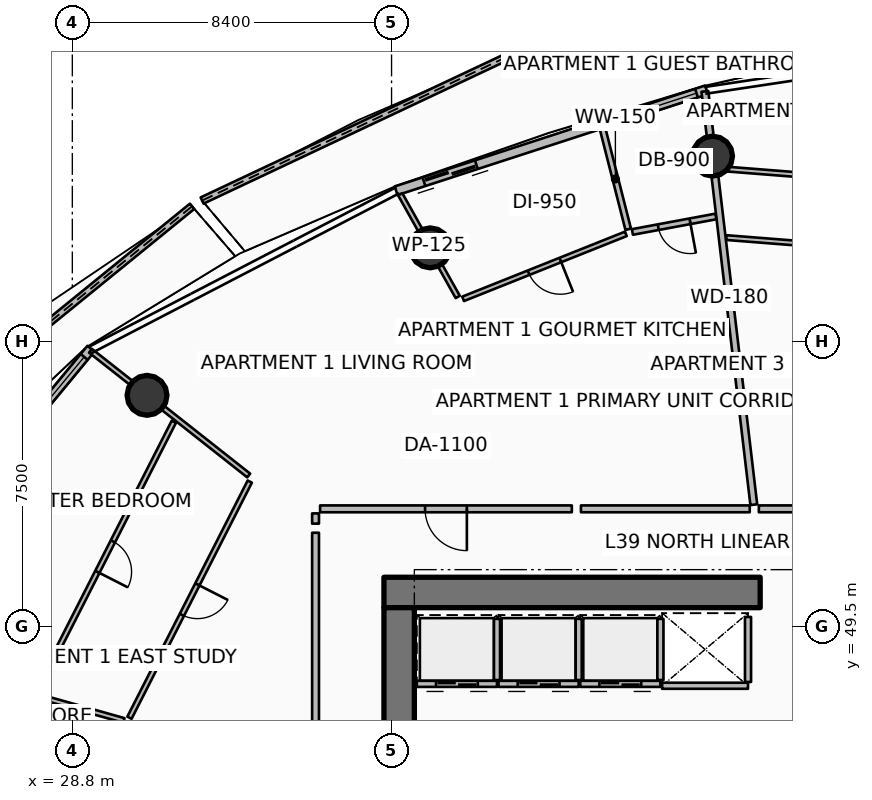
"""IFC4 building model, lengths in metres.
Left out: names, types, materials, properties, quantities, classifications, styles, units other than length and angle.
Written with IfcOpenShell. Run it as: python <this file> out.ifc"""

import sys

from ifc_helpers import new_model, si_unit, direction, frame, frame_2d, origin, origin_2d, place, context, subcontext, project, spatial, polyline, rectangle, circle, outline, extrude, element, fill, save


model = new_model("IFC4")
c1 = context("Model", 3, precision=1e-05, world=origin(), true_north=direction((0.0, 1.0)))
c2 = subcontext(c1, "Body", "Model", "MODEL_VIEW")
j1 = project(units=[si_unit("LENGTHUNIT", "METRE"), si_unit("PLANEANGLEUNIT", "RADIAN")], contexts=[c1])
p1 = place(None, origin())
s1 = spatial("IfcSite", under=j1, at=p1, CompositionType="ELEMENT")
p2 = place(p1, origin())
s2 = spatial("IfcBuilding", under=s1, at=p2, CompositionType="ELEMENT")
p3 = place(p2, frame((0.0, 0.0, 157.8)))
s3 = spatial("IfcBuildingStorey", under=s2, at=p3, CompositionType="ELEMENT", Elevation=157.8)
p4 = place(p3, frame((37.0, 50.4, 0.0), z_axis=(0.0, 0.0, 1.0), x_axis=(1.0, 0.0, 0.0)))
e1 = element("IfcWall", 1, at=p4, inside=s3, PredefinedType="SHEAR", context=c2, shape_type="SweptSolid", body=[
    extrude(rectangle(XDim=9.9, YDim=0.8, at=frame_2d((4.95, 0.0))), origin(), (0.0, 0.0, 1.0), 3.75),
])
p5 = place(p3, frame((37.4, 34.0, 0.0), z_axis=(0.0, 0.0, 1.0), x_axis=(0.0, 1.0, 0.0)))
e2 = element("IfcWall", 2, at=p5, inside=s3, PredefinedType="SHEAR", context=c2, shape_type="SweptSolid", body=[
    extrude(rectangle(XDim=16.0, YDim=0.8, at=frame_2d((8.0, 0.0))), origin(), (0.0, 0.0, 1.0), 3.75),
])
for number, where, z_axis, x_axis in (
    (3, (45.647, 61.881, 0.0), (0.0, 0.0, 1.0), (1.0, 0.0, 0.0)),
    (4, (38.218, 59.467, 0.0), (0.0, 0.0, 1.0), (1.0, 0.0, 0.0)),
    (5, (30.766, 55.586, 0.0), (0.0, 0.0, 1.0), (1.0, 0.0, 0.0)),
):
    element("IfcColumn", number, at=place(p3, frame(where, z_axis=z_axis, x_axis=x_axis)), inside=s3, PredefinedType="COLUMN", context=c2, shape_type="SweptSolid", body=[
        extrude(circle(Radius=0.525, at=origin_2d()), origin(), (0.0, 0.0, 1.0), 3.5),
    ])
p6 = place(p3, frame((40.522, 64.628, 0.0), z_axis=(0.0, 0.0, 1.0), x_axis=(-0.904569140233, -0.42632695263, 0.0)))
e6 = element("IfcWall", 6, at=p6, inside=s3, PredefinedType="PARAPET", context=c2, shape_type="SweptSolid", body=[
    extrude(outline(polyline([(0.0, 0.0), (9.184, 0.0), (9.184, 1.233), (4.592, 1.418), (0.0, 1.632), (0.0, 0.0)])), frame((0.0, 0.09, 0.0), z_axis=(0.0, -1.0, 0.0), x_axis=(1.0, 0.0, 0.0)), (0.0, 0.0, 1.0), 0.18),
])
p7 = place(p3, frame((31.951, 60.56, 0.0), z_axis=(0.0, 0.0, 1.0), x_axis=(-0.77587192649, -0.630890445073, 0.0)))
e7 = element("IfcWall", 7, at=p7, inside=s3, PredefinedType="PARAPET", context=c2, shape_type="SweptSolid", body=[
    extrude(outline(polyline([(0.0, 0.0), (9.998, 0.0), (9.998, 1.148), (4.999, 1.127), (0.0, 1.224), (0.0, 0.0)])), frame((0.0, 0.09, 0.0), z_axis=(0.0, -1.0, 0.0), x_axis=(1.0, 0.0, 0.0)), (0.0, 0.0, 1.0), 0.18),
])
p8 = place(p3, frame((45.49, 63.624, 0.0), z_axis=(0.0, 0.0, 1.0), x_axis=(-0.951046390632, -0.309048156224, 0.0)))
e8 = element("IfcWall", 8, at=p8, inside=s3, PredefinedType="SOLIDWALL", context=c2, shape_type="SweptSolid", body=[
    extrude(rectangle(XDim=8.59, YDim=0.24, at=frame_2d((4.295, 0.0))), origin(), (0.0, 0.0, 1.0), 2.45),
])
p9 = place(p8, frame((6.37, 0.0, 0.0)))
e9 = element("IfcOpeningElement", 9, at=p9, cuts=e8, PredefinedType="OPENING", context=c2, shape_type="SweptSolid", body=[
    extrude(rectangle(XDim=1.45, YDim=2.15, at=frame_2d((0.725, 1.075))), frame((0.0, 0.13, 0.0), z_axis=(0.0, -1.0, 0.0), x_axis=(1.0, 0.0, 0.0)), (0.0, 0.0, 1.0), 0.26),
])
p10 = place(p8, frame((0.28, 0.0, 0.65)))
e10 = element("IfcOpeningElement", 10, at=p10, cuts=e8, PredefinedType="OPENING", context=c2, shape_type="SweptSolid", body=[
    extrude(rectangle(XDim=1.6, YDim=1.5, at=frame_2d((0.8, 0.75))), frame((0.0, 0.13, 0.0), z_axis=(0.0, -1.0, 0.0), x_axis=(1.0, 0.0, 0.0)), (0.0, 0.0, 1.0), 0.26),
])
p11 = place(p3, frame((29.291, 56.813, 0.0), z_axis=(0.0, 0.0, 1.0), x_axis=(-0.636771922292, -0.77105221547, 0.0)))
e11 = element("IfcWall", 11, at=p11, inside=s3, PredefinedType="SOLIDWALL", context=c2, shape_type="SweptSolid", body=[
    extrude(rectangle(XDim=10.082, YDim=0.24, at=frame_2d((5.041, 0.0))), origin(), (0.0, 0.0, 1.0), 2.45),
])
p12 = place(p11, frame((7.862, 0.0, 0.0)))
e12 = element("IfcOpeningElement", 12, at=p12, cuts=e11, PredefinedType="OPENING", context=c2, shape_type="SweptSolid", body=[
    extrude(rectangle(XDim=1.45, YDim=2.15, at=frame_2d((0.725, 1.075))), frame((0.0, 0.13, 0.0), z_axis=(0.0, -1.0, 0.0), x_axis=(1.0, 0.0, 0.0)), (0.0, 0.0, 1.0), 0.26),
])
p13 = place(p11, frame((0.28, 0.0, 0.65)))
e13 = element("IfcOpeningElement", 13, at=p13, cuts=e11, PredefinedType="OPENING", context=c2, shape_type="SweptSolid", body=[
    extrude(rectangle(XDim=1.6, YDim=1.5, at=frame_2d((0.8, 0.75))), frame((0.0, 0.13, 0.0), z_axis=(0.0, -1.0, 0.0), x_axis=(1.0, 0.0, 0.0)), (0.0, 0.0, 1.0), 0.26),
])
p14 = place(p3, frame((39.975, 47.995, 0.0), z_axis=(0.0, 0.0, 1.0), x_axis=(-1.0, 0.0, 0.0)))
e14 = element("IfcWall", 14, at=p14, inside=s3, PredefinedType="PARTITIONING", context=c2, shape_type="SweptSolid", body=[
    extrude(rectangle(XDim=2.11, YDim=0.16, at=frame_2d((1.055, 0.0))), origin(), (0.0, 0.0, 1.0), 3.5),
])
p15 = place(p14, frame((0.505, 0.0, 0.0)))
e15 = element("IfcOpeningElement", 15, at=p15, cuts=e14, PredefinedType="OPENING", context=c2, shape_type="SweptSolid", body=[
    extrude(rectangle(XDim=1.1, YDim=2.1, at=frame_2d((0.55, 1.05))), frame((0.0, 0.09, 0.0), z_axis=(0.0, -1.0, 0.0), x_axis=(1.0, 0.0, 0.0)), (0.0, 0.0, 1.0), 0.18),
])
p16 = place(p3, frame((39.975, 48.095, 0.0), z_axis=(0.0, 0.0, 1.0), x_axis=(0.0, 1.0, 0.0)))
e16 = element("IfcWall", 16, at=p16, inside=s3, PredefinedType="PARTITIONING", context=c2, shape_type="SweptSolid", body=[
    extrude(rectangle(XDim=1.61, YDim=0.16, at=frame_2d((0.805, 0.0))), origin(), (0.0, 0.0, 1.0), 3.5),
])
p17 = place(p3, frame((42.125, 47.995, 0.0), z_axis=(0.0, 0.0, 1.0), x_axis=(-1.0, 0.0, 0.0)))
e17 = element("IfcWall", 17, at=p17, inside=s3, PredefinedType="PARTITIONING", context=c2, shape_type="SweptSolid", body=[
    extrude(rectangle(XDim=2.11, YDim=0.16, at=frame_2d((1.055, 0.0))), origin(), (0.0, 0.0, 1.0), 3.5),
])
p18 = place(p17, frame((0.505, 0.0, 0.0)))
e18 = element("IfcOpeningElement", 18, at=p18, cuts=e17, PredefinedType="OPENING", context=c2, shape_type="SweptSolid", body=[
    extrude(rectangle(XDim=1.1, YDim=2.1, at=frame_2d((0.55, 1.05))), frame((0.0, 0.09, 0.0), z_axis=(0.0, -1.0, 0.0), x_axis=(1.0, 0.0, 0.0)), (0.0, 0.0, 1.0), 0.18),
])
p19 = place(p3, frame((42.125, 48.095, 0.0), z_axis=(0.0, 0.0, 1.0), x_axis=(0.0, 1.0, 0.0)))
e19 = element("IfcWall", 19, at=p19, inside=s3, PredefinedType="PARTITIONING", context=c2, shape_type="SweptSolid", body=[
    extrude(rectangle(XDim=1.61, YDim=0.16, at=frame_2d((0.805, 0.0))), origin(), (0.0, 0.0, 1.0), 3.5),
])
p20 = place(p3, frame((44.275, 47.995, 0.0), z_axis=(0.0, 0.0, 1.0), x_axis=(-1.0, 0.0, 0.0)))
e20 = element("IfcWall", 20, at=p20, inside=s3, PredefinedType="PARTITIONING", context=c2, shape_type="SweptSolid", body=[
    extrude(rectangle(XDim=2.11, YDim=0.16, at=frame_2d((1.055, 0.0))), origin(), (0.0, 0.0, 1.0), 3.5),
])
p21 = place(p20, frame((0.505, 0.0, 0.0)))
e21 = element("IfcOpeningElement", 21, at=p21, cuts=e20, PredefinedType="OPENING", context=c2, shape_type="SweptSolid", body=[
    extrude(rectangle(XDim=1.1, YDim=2.1, at=frame_2d((0.55, 1.05))), frame((0.0, 0.09, 0.0), z_axis=(0.0, -1.0, 0.0), x_axis=(1.0, 0.0, 0.0)), (0.0, 0.0, 1.0), 0.18),
])
p22 = place(p3, frame((44.275, 48.095, 0.0), z_axis=(0.0, 0.0, 1.0), x_axis=(0.0, 1.0, 0.0)))
e22 = element("IfcWall", 22, at=p22, inside=s3, PredefinedType="PARTITIONING", context=c2, shape_type="SweptSolid", body=[
    extrude(rectangle(XDim=1.61, YDim=0.16, at=frame_2d((0.805, 0.0))), origin(), (0.0, 0.0, 1.0), 3.5),
])
p23 = place(p3, frame((46.58, 47.945, 0.0), z_axis=(0.0, 0.0, 1.0), x_axis=(-1.0, 0.0, 0.0)))
e23 = element("IfcWall", 23, at=p23, inside=s3, PredefinedType="PARTITIONING", context=c2, shape_type="SweptSolid", body=[
    extrude(rectangle(XDim=2.26, YDim=0.16, at=frame_2d((1.13, 0.0))), origin(), (0.0, 0.0, 1.0), 3.5),
])
p24 = place(p3, frame((46.58, 48.045, 0.0), z_axis=(0.0, 0.0, 1.0), x_axis=(0.0, 1.0, 0.0)))
e24 = element("IfcWall", 24, at=p24, inside=s3, PredefinedType="PARTITIONING", context=c2, shape_type="SweptSolid", body=[
    extrude(rectangle(XDim=1.71, YDim=0.16, at=frame_2d((0.855, 0.0))), origin(), (0.0, 0.0, 1.0), 3.5),
])
p25 = place(p3, frame((46.732, 52.709, 0.0), z_axis=(0.0, 0.0, 1.0), x_axis=(-0.117537145285, 0.993068486802, 0.0)))
e25 = element("IfcWall", 25, at=p25, inside=s3, PredefinedType="PARTITIONING", context=c2, shape_type="SweptSolid", body=[
    extrude(rectangle(XDim=10.951, YDim=0.18, at=frame_2d((5.475, 0.0))), origin(), (0.0, 0.0, 1.0), 2.94),
])
p26 = place(p3, frame((41.944, 52.6, 0.0), z_axis=(0.0, 0.0, 1.0), x_axis=(-1.0, 0.0, 0.0)))
e26 = element("IfcWall", 26, at=p26, inside=s3, PredefinedType="PARTITIONING", context=c2, shape_type="SweptSolid", body=[
    extrude(rectangle(XDim=6.624, YDim=0.18, at=frame_2d((3.312, 0.0))), origin(), (0.0, 0.0, 1.0), 2.94),
])
p27 = place(p26, frame((2.762, 0.0, 0.0)))
e27 = element("IfcOpeningElement", 27, at=p27, cuts=e26, PredefinedType="OPENING", context=c2, shape_type="SweptSolid", body=[
    extrude(rectangle(XDim=1.1, YDim=2.1, at=frame_2d((0.55, 1.05))), frame((0.0, 0.1, 0.0), z_axis=(0.0, -1.0, 0.0), x_axis=(1.0, 0.0, 0.0)), (0.0, 0.0, 1.0), 0.2),
])
p28 = place(p3, frame((35.2, 52.48, 0.0), z_axis=(0.0, 0.0, 1.0), x_axis=(0.0, -1.0, 0.0)))
e28 = element("IfcWall", 28, at=p28, inside=s3, PredefinedType="PARTITIONING", context=c2, shape_type="SweptSolid", body=[
    extrude(rectangle(XDim=0.269, YDim=0.18, at=frame_2d((0.135, 0.0))), origin(), (0.0, 0.0, 1.0), 2.94),
])
p29 = place(p3, frame((46.625, 52.6, 0.0), z_axis=(0.0, 0.0, 1.0), x_axis=(-1.0, 0.0, 0.0)))
e29 = element("IfcWall", 29, at=p29, inside=s3, PredefinedType="PARTITIONING", context=c2, shape_type="SweptSolid", body=[
    extrude(rectangle(XDim=4.442, YDim=0.18, at=frame_2d((2.221, 0.0))), origin(), (0.0, 0.0, 1.0), 2.94),
])
p30 = place(p3, frame((38.941, 58.175, 0.0), z_axis=(0.0, 0.0, 1.0), x_axis=(-0.488620181058, 0.872496600946, 0.0)))
e30 = element("IfcWall", 30, at=p30, inside=s3, PredefinedType="PARTITIONING", context=c2, shape_type="SweptSolid", body=[
    extrude(rectangle(XDim=3.095, YDim=0.125, at=frame_2d((1.548, 0.0))), origin(), (0.0, 0.0, 1.0), 2.94),
])
p31 = place(p3, frame((45.734, 60.293, 0.0), z_axis=(0.0, 0.0, 1.0), x_axis=(-0.983182569162, -0.182625397184, 0.0)))
e31 = element("IfcWall", 31, at=p31, inside=s3, PredefinedType="PARTITIONING", context=c2, shape_type="SweptSolid", body=[
    extrude(rectangle(XDim=2.234, YDim=0.15, at=frame_2d((1.117, 0.0))), origin(), (0.0, 0.0, 1.0), 2.94),
])
p32 = place(p31, frame((0.692, 0.0, 0.0)))
e32 = element("IfcOpeningElement", 32, at=p32, cuts=e31, PredefinedType="OPENING", context=c2, shape_type="SweptSolid", body=[
    extrude(rectangle(XDim=0.85, YDim=2.06, at=frame_2d((0.425, 1.03))), frame((0.0, 0.085, 0.0), z_axis=(0.0, -1.0, 0.0), x_axis=(1.0, 0.0, 0.0)), (0.0, 0.0, 1.0), 0.17),
])
p33 = place(p3, frame((43.427, 59.956, 0.0), z_axis=(0.0, 0.0, 1.0), x_axis=(-0.246779972966, 0.969071537578, 0.0)))
e33 = element("IfcWall", 33, at=p33, inside=s3, PredefinedType="PARTITIONING", context=c2, shape_type="SweptSolid", body=[
    extrude(rectangle(XDim=2.732, YDim=0.15, at=frame_2d((1.366, 0.0))), origin(), (0.0, 0.0, 1.0), 2.94),
])
p34 = place(p3, frame((43.366, 59.835, 0.0), z_axis=(0.0, 0.0, 1.0), x_axis=(-0.928691950022, -0.370852075584, 0.0)))
e34 = element("IfcWall", 34, at=p34, inside=s3, PredefinedType="PARTITIONING", context=c2, shape_type="SweptSolid", body=[
    extrude(rectangle(XDim=4.612, YDim=0.125, at=frame_2d((2.306, 0.0))), origin(), (0.0, 0.0, 1.0), 2.94),
])
p35 = place(p34, frame((1.856, 0.0, 0.0)))
e35 = element("IfcOpeningElement", 35, at=p35, cuts=e34, PredefinedType="OPENING", context=c2, shape_type="SweptSolid", body=[
    extrude(rectangle(XDim=0.9, YDim=2.08, at=frame_2d((0.45, 1.04))), frame((0.0, 0.073, 0.0), z_axis=(0.0, -1.0, 0.0), x_axis=(1.0, 0.0, 0.0)), (0.0, 0.0, 1.0), 0.145),
])
p36 = place(p3, frame((35.2, 51.971, 0.0), z_axis=(0.0, 0.0, 1.0), x_axis=(0.0, -1.0, 0.0)))
e36 = element("IfcWall", 36, at=p36, inside=s3, PredefinedType="PARTITIONING", context=c2, shape_type="SweptSolid", body=[
    extrude(rectangle(XDim=6.241, YDim=0.18, at=frame_2d((3.12, 0.0))), origin(), (0.0, 0.0, 1.0), 2.94),
])
p37 = place(p3, frame((33.441, 53.477, 0.0), z_axis=(0.0, 0.0, 1.0), x_axis=(-0.785319981095, 0.619090080112, 0.0)))
e37 = element("IfcWall", 37, at=p37, inside=s3, PredefinedType="PARTITIONING", context=c2, shape_type="SweptSolid", body=[
    extrude(rectangle(XDim=5.301, YDim=0.125, at=frame_2d((2.65, 0.0))), origin(), (0.0, 0.0, 1.0), 2.94),
])
p38 = place(p3, frame((33.469, 53.317, 0.0), z_axis=(0.0, 0.0, 1.0), x_axis=(-0.453977694262, -0.891013048789, 0.0)))
e38 = element("IfcWall", 38, at=p38, inside=s3, PredefinedType="PARTITIONING", context=c2, shape_type="SweptSolid", body=[
    extrude(rectangle(XDim=6.974, YDim=0.125, at=frame_2d((3.487, 0.0))), origin(), (0.0, 0.0, 1.0), 2.94),
])
p39 = place(p38, frame((3.037, 0.0, 0.0)))
e39 = element("IfcOpeningElement", 39, at=p39, cuts=e38, PredefinedType="OPENING", context=c2, shape_type="SweptSolid", body=[
    extrude(rectangle(XDim=0.9, YDim=2.08, at=frame_2d((0.45, 1.04))), frame((0.0, 0.073, 0.0), z_axis=(0.0, -1.0, 0.0), x_axis=(1.0, 0.0, 0.0)), (0.0, 0.0, 1.0), 0.145),
])
p40 = place(p3, frame((31.472, 54.892, 0.0), z_axis=(0.0, 0.0, 1.0), x_axis=(-0.453991424948, -0.89100605277, 0.0)))
e40 = element("IfcWall", 40, at=p40, inside=s3, PredefinedType="PARTITIONING", context=c2, shape_type="SweptSolid", body=[
    extrude(rectangle(XDim=7.967, YDim=0.125, at=frame_2d((3.983, 0.0))), origin(), (0.0, 0.0, 1.0), 2.94),
])
p41 = place(p40, frame((3.534, 0.0, 0.0)))
e41 = element("IfcOpeningElement", 41, at=p41, cuts=e40, PredefinedType="OPENING", context=c2, shape_type="SweptSolid", body=[
    extrude(rectangle(XDim=0.9, YDim=2.08, at=frame_2d((0.45, 1.04))), frame((0.0, 0.073, 0.0), z_axis=(0.0, -1.0, 0.0), x_axis=(1.0, 0.0, 0.0)), (0.0, 0.0, 1.0), 0.145),
])
p42 = place(p3, frame((30.157, 47.032, 0.0), z_axis=(0.0, 0.0, 1.0), x_axis=(-0.962456736489, 0.271435131084, 0.0)))
e42 = element("IfcWall", 42, at=p42, inside=s3, PredefinedType="PARTITIONING", context=c2, shape_type="SweptSolid", body=[
    extrude(rectangle(XDim=7.412, YDim=0.125, at=frame_2d((3.706, 0.0))), origin(), (0.0, 0.0, 1.0), 2.94),
])
p43 = place(p3, frame((50.869, 52.6, 0.0), z_axis=(0.0, 0.0, 1.0), x_axis=(-1.0, 0.0, 0.0)))
e43 = element("IfcWall", 43, at=p43, inside=s3, PredefinedType="PARTITIONING", context=c2, shape_type="SweptSolid", body=[
    extrude(rectangle(XDim=4.004, YDim=0.18, at=frame_2d((2.002, 0.0))), origin(), (0.0, 0.0, 1.0), 2.94),
])
p44 = place(p3, frame((52.741, 59.208, 0.0), z_axis=(0.0, 0.0, 1.0), x_axis=(-0.996917452966, 0.078457580711, 0.0)))
e44 = element("IfcWall", 44, at=p44, inside=s3, PredefinedType="PARTITIONING", context=c2, shape_type="SweptSolid", body=[
    extrude(rectangle(XDim=6.752, YDim=0.125, at=frame_2d((3.376, 0.0))), origin(), (0.0, 0.0, 1.0), 2.94),
])
p45 = place(p44, frame((2.926, 0.0, 0.0)))
e45 = element("IfcOpeningElement", 45, at=p45, cuts=e44, PredefinedType="OPENING", context=c2, shape_type="SweptSolid", body=[
    extrude(rectangle(XDim=0.9, YDim=2.08, at=frame_2d((0.45, 1.04))), frame((0.0, 0.073, 0.0), z_axis=(0.0, -1.0, 0.0), x_axis=(1.0, 0.0, 0.0)), (0.0, 0.0, 1.0), 0.145),
])
p46 = place(p3, frame((53.239, 60.972, 0.0), z_axis=(0.0, 0.0, 1.0), x_axis=(-0.996916953075, 0.078463932292, 0.0)))
e46 = element("IfcWall", 46, at=p46, inside=s3, PredefinedType="PARTITIONING", context=c2, shape_type="SweptSolid", body=[
    extrude(rectangle(XDim=7.468, YDim=0.125, at=frame_2d((3.734, 0.0))), origin(), (0.0, 0.0, 1.0), 2.94),
])
p47 = place(p46, frame((3.284, 0.0, 0.0)))
e47 = element("IfcOpeningElement", 47, at=p47, cuts=e46, PredefinedType="OPENING", context=c2, shape_type="SweptSolid", body=[
    extrude(rectangle(XDim=0.9, YDim=2.08, at=frame_2d((0.45, 1.04))), frame((0.0, 0.073, 0.0), z_axis=(0.0, -1.0, 0.0), x_axis=(1.0, 0.0, 0.0)), (0.0, 0.0, 1.0), 0.145),
])
p48 = place(p9, origin())
e48 = element("IfcDoor", 48, at=p48, inside=s3, OperationType="DOUBLE_DOOR_SLIDING", PredefinedType="DOOR", context=c2, shape_type="SweptSolid", body=[
    extrude(rectangle(XDim=1.45, YDim=2.15, at=frame_2d((0.725, 1.075))), frame((0.0, 0.025, 0.0), z_axis=(0.0, -1.0, 0.0), x_axis=(1.0, 0.0, 0.0)), (0.0, 0.0, 1.0), 0.05),
])
fill(e9, e48)
p49 = place(p10, origin())
e49 = element("IfcWindow", 49, at=p49, inside=s3, PartitioningType="SINGLE_PANEL", PredefinedType="WINDOW", context=c2, shape_type="SweptSolid", body=[
    extrude(rectangle(XDim=1.6, YDim=1.5, at=frame_2d((0.8, 0.75))), frame((0.0, 0.03, 0.0), z_axis=(0.0, -1.0, 0.0), x_axis=(1.0, 0.0, 0.0)), (0.0, 0.0, 1.0), 0.06),
])
fill(e10, e49)
p50 = place(p13, origin())
e50 = element("IfcWindow", 50, at=p50, inside=s3, PartitioningType="SINGLE_PANEL", PredefinedType="WINDOW", context=c2, shape_type="SweptSolid", body=[
    extrude(rectangle(XDim=1.6, YDim=1.5, at=frame_2d((0.8, 0.75))), frame((0.0, 0.03, 0.0), z_axis=(0.0, -1.0, 0.0), x_axis=(1.0, 0.0, 0.0)), (0.0, 0.0, 1.0), 0.06),
])
fill(e13, e50)
p51 = place(p15, origin())
e51 = element("IfcDoor", 51, at=p51, inside=s3, OperationType="DOUBLE_DOOR_SLIDING", PredefinedType="DOOR", context=c2, shape_type="SweptSolid", body=[
    extrude(rectangle(XDim=1.1, YDim=2.1, at=frame_2d((0.55, 1.05))), frame((0.0, 0.025, 0.0), z_axis=(0.0, -1.0, 0.0), x_axis=(1.0, 0.0, 0.0)), (0.0, 0.0, 1.0), 0.05),
])
fill(e15, e51)
p52 = place(p18, origin())
e52 = element("IfcDoor", 52, at=p52, inside=s3, OperationType="DOUBLE_DOOR_SLIDING", PredefinedType="DOOR", context=c2, shape_type="SweptSolid", body=[
    extrude(rectangle(XDim=1.1, YDim=2.1, at=frame_2d((0.55, 1.05))), frame((0.0, 0.025, 0.0), z_axis=(0.0, -1.0, 0.0), x_axis=(1.0, 0.0, 0.0)), (0.0, 0.0, 1.0), 0.05),
])
fill(e18, e52)
p53 = place(p21, origin())
e53 = element("IfcDoor", 53, at=p53, inside=s3, OperationType="DOUBLE_DOOR_SLIDING", PredefinedType="DOOR", context=c2, shape_type="SweptSolid", body=[
    extrude(rectangle(XDim=1.1, YDim=2.1, at=frame_2d((0.55, 1.05))), frame((0.0, 0.025, 0.0), z_axis=(0.0, -1.0, 0.0), x_axis=(1.0, 0.0, 0.0)), (0.0, 0.0, 1.0), 0.05),
])
fill(e21, e53)
p54 = place(p27, origin())
e54 = element("IfcDoor", 54, at=p54, inside=s3, OperationType="SINGLE_SWING_LEFT", PredefinedType="DOOR", context=c2, shape_type="SweptSolid", body=[
    extrude(rectangle(XDim=1.1, YDim=2.1, at=frame_2d((0.55, 1.05))), frame((0.0, 0.025, 0.0), z_axis=(0.0, -1.0, 0.0), x_axis=(1.0, 0.0, 0.0)), (0.0, 0.0, 1.0), 0.05),
])
fill(e27, e54)
p55 = place(p32, origin())
e55 = element("IfcDoor", 55, at=p55, inside=s3, OperationType="SINGLE_SWING_LEFT", PredefinedType="DOOR", context=c2, shape_type="SweptSolid", body=[
    extrude(rectangle(XDim=0.85, YDim=2.06, at=frame_2d((0.425, 1.03))), frame((0.0, 0.025, 0.0), z_axis=(0.0, -1.0, 0.0), x_axis=(1.0, 0.0, 0.0)), (0.0, 0.0, 1.0), 0.05),
])
fill(e32, e55)
p56 = place(p35, origin())
e56 = element("IfcDoor", 56, at=p56, inside=s3, OperationType="SINGLE_SWING_LEFT", PredefinedType="DOOR", context=c2, shape_type="SweptSolid", body=[
    extrude(rectangle(XDim=0.9, YDim=2.08, at=frame_2d((0.45, 1.04))), frame((0.0, 0.025, 0.0), z_axis=(0.0, -1.0, 0.0), x_axis=(1.0, 0.0, 0.0)), (0.0, 0.0, 1.0), 0.05),
])
fill(e35, e56)
p57 = place(p39, origin())
e57 = element("IfcDoor", 57, at=p57, inside=s3, OperationType="SINGLE_SWING_LEFT", PredefinedType="DOOR", context=c2, shape_type="SweptSolid", body=[
    extrude(rectangle(XDim=0.9, YDim=2.08, at=frame_2d((0.45, 1.04))), frame((0.0, 0.025, 0.0), z_axis=(0.0, -1.0, 0.0), x_axis=(1.0, 0.0, 0.0)), (0.0, 0.0, 1.0), 0.05),
])
fill(e39, e57)
p58 = place(p41, origin())
e58 = element("IfcDoor", 58, at=p58, inside=s3, OperationType="SINGLE_SWING_RIGHT", PredefinedType="DOOR", context=c2, shape_type="SweptSolid", body=[
    extrude(rectangle(XDim=0.9, YDim=2.08, at=frame_2d((0.45, 1.04))), frame((0.0, 0.025, 0.0), z_axis=(0.0, -1.0, 0.0), x_axis=(1.0, 0.0, 0.0)), (0.0, 0.0, 1.0), 0.05),
])
fill(e41, e58)
save(model, sys.argv[1])
